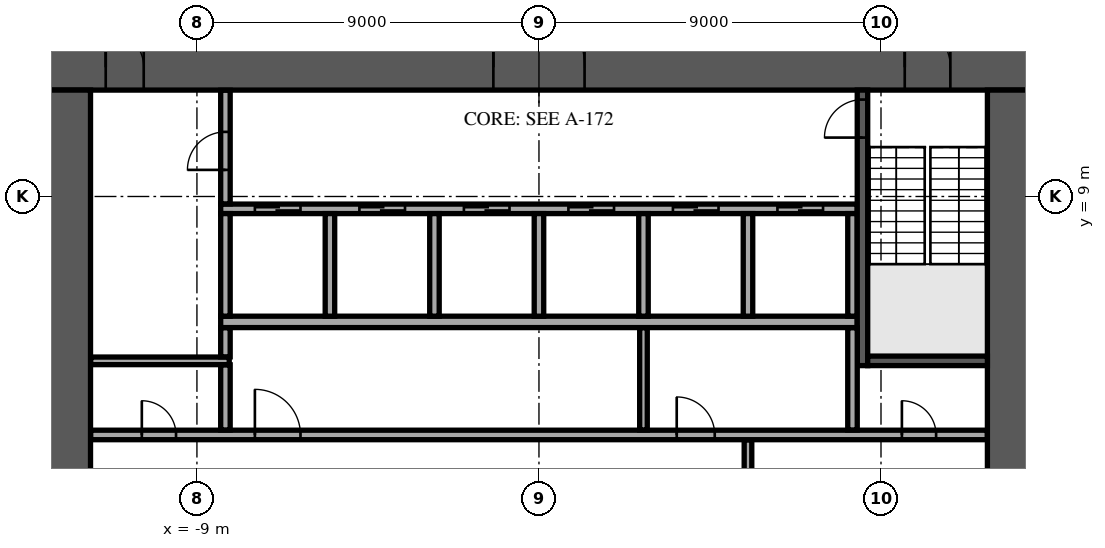
"""IFC4 building model, lengths in metres.
Left out: names, types, materials, properties, quantities, classifications, styles, units other than length and angle.
Written with IfcOpenShell. Run it as: python <this file> out.ifc"""

import sys

from ifc_helpers import new_model, si_unit, direction, frame, frame_2d, origin, place, context, subcontext, project, spatial, rectangle, extrude, element, fill, save


model = new_model("IFC4")
c1 = context("Model", 3, precision=1e-05, world=origin(), true_north=direction((0.0, 1.0)))
c2 = subcontext(c1, "Body", "Model", "MODEL_VIEW")
j1 = project(units=[si_unit("LENGTHUNIT", "METRE"), si_unit("PLANEANGLEUNIT", "RADIAN")], contexts=[c1])
p1 = place(None, origin())
s1 = spatial("IfcSite", under=j1, at=p1, CompositionType="ELEMENT")
p2 = place(p1, origin())
s2 = spatial("IfcBuilding", under=s1, at=p2, CompositionType="ELEMENT")
p3 = place(p2, frame((0.0, 0.0, 59.7)))
s3 = spatial("IfcBuildingStorey", under=s2, at=p3, CompositionType="ELEMENT", Elevation=59.7)
p4 = place(p3, frame((-13.0, 12.4, 0.0), z_axis=(0.0, 0.0, 1.0), x_axis=(1.0, 0.0, 0.0)))
e1 = element("IfcWall", 1, at=p4, inside=s3, PredefinedType="SHEAR", context=c2, shape_type="SweptSolid", body=[
    extrude(rectangle(XDim=26.0, YDim=1.2, at=frame_2d((13.0, 0.0))), origin(), (0.0, 0.0, 1.0), 3.75),
])
p5 = place(p4, frame((11.8, 0.0, 0.0)))
e2 = element("IfcOpeningElement", 2, at=p5, cuts=e1, PredefinedType="OPENING", context=c2, shape_type="SweptSolid", body=[
    extrude(rectangle(XDim=2.4, YDim=2.4, at=frame_2d((1.2, 1.2))), frame((0.0, 0.61, 0.0), z_axis=(0.0, -1.0, 0.0), x_axis=(1.0, 0.0, 0.0)), (0.0, 0.0, 1.0), 1.22),
])
p6 = place(p4, frame((22.625, 0.0, 0.0)))
e3 = element("IfcOpeningElement", 3, at=p6, cuts=e1, PredefinedType="OPENING", context=c2, shape_type="SweptSolid", body=[
    extrude(rectangle(XDim=1.2, YDim=2.1, at=frame_2d((0.6, 1.05))), frame((0.0, 0.61, 0.0), z_axis=(0.0, -1.0, 0.0), x_axis=(1.0, 0.0, 0.0)), (0.0, 0.0, 1.0), 1.22),
])
p7 = place(p4, frame((1.6, 0.0, 0.0)))
e4 = element("IfcOpeningElement", 4, at=p7, cuts=e1, PredefinedType="OPENING", context=c2, shape_type="SweptSolid", body=[
    extrude(rectangle(XDim=1.0, YDim=2.1, at=frame_2d((0.5, 1.05))), frame((0.0, 0.61, 0.0), z_axis=(0.0, -1.0, 0.0), x_axis=(1.0, 0.0, 0.0)), (0.0, 0.0, 1.0), 1.22),
])
p8 = place(p3, frame((12.4, -11.8, 0.0), z_axis=(0.0, 0.0, 1.0), x_axis=(0.0, 1.0, 0.0)))
e5 = element("IfcWall", 5, at=p8, inside=s3, PredefinedType="SHEAR", context=c2, shape_type="SweptSolid", body=[
    extrude(rectangle(XDim=23.6, YDim=1.2, at=frame_2d((11.8, 0.0))), origin(), (0.0, 0.0, 1.0), 3.75),
])
p9 = place(p8, frame((10.6, 0.0, 0.0)))
e6 = element("IfcOpeningElement", 6, at=p9, cuts=e5, PredefinedType="OPENING", context=c2, shape_type="SweptSolid", body=[
    extrude(rectangle(XDim=2.4, YDim=2.4, at=frame_2d((1.2, 1.2))), frame((0.0, 0.61, 0.0), z_axis=(0.0, -1.0, 0.0), x_axis=(1.0, 0.0, 0.0)), (0.0, 0.0, 1.0), 1.22),
])
p10 = place(p3, frame((-12.4, -11.8, 0.0), z_axis=(0.0, 0.0, 1.0), x_axis=(0.0, 1.0, 0.0)))
e7 = element("IfcWall", 7, at=p10, inside=s3, PredefinedType="SHEAR", context=c2, shape_type="SweptSolid", body=[
    extrude(rectangle(XDim=23.6, YDim=1.2, at=frame_2d((11.8, 0.0))), origin(), (0.0, 0.0, 1.0), 3.75),
])
p11 = place(p10, frame((10.6, 0.0, 0.0)))
e8 = element("IfcOpeningElement", 8, at=p11, cuts=e7, PredefinedType="OPENING", context=c2, shape_type="SweptSolid", body=[
    extrude(rectangle(XDim=2.4, YDim=2.4, at=frame_2d((1.2, 1.2))), frame((0.0, 0.61, 0.0), z_axis=(0.0, -1.0, 0.0), x_axis=(1.0, 0.0, 0.0)), (0.0, 0.0, 1.0), 1.22),
])
p12 = place(p3, frame((-8.375, 5.7, 0.0), z_axis=(0.0, 0.0, 1.0), x_axis=(1.0, 0.0, 0.0)))
e9 = element("IfcWall", 9, at=p12, inside=s3, PredefinedType="SOLIDWALL", context=c2, shape_type="SweptSolid", body=[
    extrude(rectangle(XDim=16.75, YDim=0.3, at=frame_2d((8.375, 0.0))), origin(), (0.0, 0.0, 1.0), 3.75),
])
p13 = place(p3, frame((-8.375, 8.675, 0.0), z_axis=(0.0, 0.0, 1.0), x_axis=(1.0, 0.0, 0.0)))
e10 = element("IfcWall", 10, at=p13, inside=s3, PredefinedType="SOLIDWALL", context=c2, shape_type="SweptSolid", body=[
    extrude(rectangle(XDim=16.75, YDim=0.25, at=frame_2d((8.375, 0.0))), origin(), (0.0, 0.0, 1.0), 3.75),
])
p14 = place(p13, frame((0.9, 0.0, 0.0)))
e11 = element("IfcOpeningElement", 11, at=p14, cuts=e10, PredefinedType="OPENING", context=c2, shape_type="SweptSolid", body=[
    extrude(rectangle(XDim=1.2, YDim=2.1, at=frame_2d((0.6, 1.05))), frame((0.0, 0.135, 0.0), z_axis=(0.0, -1.0, 0.0), x_axis=(1.0, 0.0, 0.0)), (0.0, 0.0, 1.0), 0.27),
])
p15 = place(p13, frame((3.65, 0.0, 0.0)))
e12 = element("IfcOpeningElement", 12, at=p15, cuts=e10, PredefinedType="OPENING", context=c2, shape_type="SweptSolid", body=[
    extrude(rectangle(XDim=1.2, YDim=2.1, at=frame_2d((0.6, 1.05))), frame((0.0, 0.135, 0.0), z_axis=(0.0, -1.0, 0.0), x_axis=(1.0, 0.0, 0.0)), (0.0, 0.0, 1.0), 0.27),
])
p16 = place(p13, frame((6.4, 0.0, 0.0)))
e13 = element("IfcOpeningElement", 13, at=p16, cuts=e10, PredefinedType="OPENING", context=c2, shape_type="SweptSolid", body=[
    extrude(rectangle(XDim=1.2, YDim=2.1, at=frame_2d((0.6, 1.05))), frame((0.0, 0.135, 0.0), z_axis=(0.0, -1.0, 0.0), x_axis=(1.0, 0.0, 0.0)), (0.0, 0.0, 1.0), 0.27),
])
p17 = place(p13, frame((9.15, 0.0, 0.0)))
e14 = element("IfcOpeningElement", 14, at=p17, cuts=e10, PredefinedType="OPENING", context=c2, shape_type="SweptSolid", body=[
    extrude(rectangle(XDim=1.2, YDim=2.1, at=frame_2d((0.6, 1.05))), frame((0.0, 0.135, 0.0), z_axis=(0.0, -1.0, 0.0), x_axis=(1.0, 0.0, 0.0)), (0.0, 0.0, 1.0), 0.27),
])
p18 = place(p13, frame((11.9, 0.0, 0.0)))
e15 = element("IfcOpeningElement", 15, at=p18, cuts=e10, PredefinedType="OPENING", context=c2, shape_type="SweptSolid", body=[
    extrude(rectangle(XDim=1.2, YDim=2.1, at=frame_2d((0.6, 1.05))), frame((0.0, 0.135, 0.0), z_axis=(0.0, -1.0, 0.0), x_axis=(1.0, 0.0, 0.0)), (0.0, 0.0, 1.0), 0.27),
])
p19 = place(p13, frame((14.65, 0.0, 0.0)))
e16 = element("IfcOpeningElement", 16, at=p19, cuts=e10, PredefinedType="OPENING", context=c2, shape_type="SweptSolid", body=[
    extrude(rectangle(XDim=1.2, YDim=2.1, at=frame_2d((0.6, 1.05))), frame((0.0, 0.135, 0.0), z_axis=(0.0, -1.0, 0.0), x_axis=(1.0, 0.0, 0.0)), (0.0, 0.0, 1.0), 0.27),
])
for number, where, z_axis, x_axis in (
    (17, (-8.25, 5.85, 0.0), (0.0, 0.0, 1.0), (0.0, 1.0, 0.0)),
    (18, (-5.5, 5.85, 0.0), (0.0, 0.0, 1.0), (0.0, 1.0, 0.0)),
    (19, (-2.75, 5.85, 0.0), (0.0, 0.0, 1.0), (0.0, 1.0, 0.0)),
    (20, (0.0, 5.85, 0.0), (0.0, 0.0, 1.0), (0.0, 1.0, 0.0)),
    (21, (2.75, 5.85, 0.0), (0.0, 0.0, 1.0), (0.0, 1.0, 0.0)),
    (22, (5.5, 5.85, 0.0), (0.0, 0.0, 1.0), (0.0, 1.0, 0.0)),
    (23, (8.25, 5.85, 0.0), (0.0, 0.0, 1.0), (0.0, 1.0, 0.0)),
):
    element("IfcWall", number, at=place(p3, frame(where, z_axis=z_axis, x_axis=x_axis)), inside=s3, PredefinedType="SOLIDWALL", context=c2, shape_type="SweptSolid", body=[
        extrude(rectangle(XDim=2.7, YDim=0.25, at=frame_2d((1.35, 0.0))), origin(), (0.0, 0.0, 1.0), 3.75),
    ])
p20 = place(p3, frame((8.512, 4.55, 0.0), z_axis=(0.0, 0.0, 1.0), x_axis=(0.0, 1.0, 0.0)))
e24 = element("IfcWall", 24, at=p20, inside=s3, PredefinedType="SOLIDWALL", context=c2, shape_type="SweptSolid", body=[
    extrude(rectangle(XDim=7.25, YDim=0.275, at=frame_2d((3.625, 0.0))), origin(), (0.0, 0.0, 1.0), 3.75),
])
p21 = place(p20, frame((6.0, 0.0, 0.0)))
e25 = element("IfcOpeningElement", 25, at=p21, cuts=e24, PredefinedType="OPENING", context=c2, shape_type="SweptSolid", body=[
    extrude(rectangle(XDim=1.0, YDim=2.1, at=frame_2d((0.5, 1.05))), frame((0.0, 0.147, 0.0), z_axis=(0.0, -1.0, 0.0), x_axis=(1.0, 0.0, 0.0)), (0.0, 0.0, 1.0), 0.295),
])
p22 = place(p3, frame((8.65, 4.675, 0.0), z_axis=(0.0, 0.0, 1.0), x_axis=(1.0, 0.0, 0.0)))
e26 = element("IfcWall", 26, at=p22, inside=s3, PredefinedType="SOLIDWALL", context=c2, shape_type="SweptSolid", body=[
    extrude(rectangle(XDim=3.15, YDim=0.25, at=frame_2d((1.575, 0.0))), origin(), (0.0, 0.0, 1.0), 3.75),
])
p23 = place(p3, frame((5.5, -2.595, 0.0), z_axis=(0.0, 0.0, 1.0), x_axis=(0.0, 1.0, 0.0)))
e27 = element("IfcWall", 27, at=p23, inside=s3, PredefinedType="PARTITIONING", context=c2, shape_type="SweptSolid", body=[
    extrude(rectangle(XDim=5.19, YDim=0.2, at=frame_2d((2.595, 0.0))), origin(), (0.0, 0.0, 1.0), 3.75),
])
p24 = place(p23, frame((1.395, 0.0, 0.0)))
e28 = element("IfcOpeningElement", 28, at=p24, cuts=e27, PredefinedType="OPENING", context=c2, shape_type="SweptSolid", body=[
    extrude(rectangle(XDim=2.4, YDim=2.4, at=frame_2d((1.2, 1.2))), frame((0.0, 0.11, 0.0), z_axis=(0.0, -1.0, 0.0), x_axis=(1.0, 0.0, 0.0)), (0.0, 0.0, 1.0), 0.22),
])
p25 = place(p3, frame((-11.795, 2.725, 0.0), z_axis=(0.0, 0.0, 1.0), x_axis=(1.0, 0.0, 0.0)))
e29 = element("IfcWall", 29, at=p25, inside=s3, PredefinedType="PARTITIONING", context=c2, shape_type="SweptSolid", body=[
    extrude(rectangle(XDim=23.59, YDim=0.25, at=frame_2d((11.795, 0.0))), origin(), (0.0, 0.0, 1.0), 3.75),
])
p26 = place(p25, frame((21.345, 0.0, 0.0)))
e30 = element("IfcOpeningElement", 30, at=p26, cuts=e29, PredefinedType="OPENING", context=c2, shape_type="SweptSolid", body=[
    extrude(rectangle(XDim=0.9, YDim=2.1, at=frame_2d((0.45, 1.05))), frame((0.0, 0.135, 0.0), z_axis=(0.0, -1.0, 0.0), x_axis=(1.0, 0.0, 0.0)), (0.0, 0.0, 1.0), 0.27),
])
p27 = place(p25, frame((1.345, 0.0, 0.0)))
e31 = element("IfcOpeningElement", 31, at=p27, cuts=e29, PredefinedType="OPENING", context=c2, shape_type="SweptSolid", body=[
    extrude(rectangle(XDim=0.9, YDim=2.1, at=frame_2d((0.45, 1.05))), frame((0.0, 0.135, 0.0), z_axis=(0.0, -1.0, 0.0), x_axis=(1.0, 0.0, 0.0)), (0.0, 0.0, 1.0), 0.27),
])
p28 = place(p25, frame((4.32, 0.0, 0.0)))
e32 = element("IfcOpeningElement", 32, at=p28, cuts=e29, PredefinedType="OPENING", context=c2, shape_type="SweptSolid", body=[
    extrude(rectangle(XDim=1.2, YDim=2.1, at=frame_2d((0.6, 1.05))), frame((0.0, 0.135, 0.0), z_axis=(0.0, -1.0, 0.0), x_axis=(1.0, 0.0, 0.0)), (0.0, 0.0, 1.0), 0.27),
])
p29 = place(p25, frame((15.42, 0.0, 0.0)))
e33 = element("IfcOpeningElement", 33, at=p29, cuts=e29, PredefinedType="OPENING", context=c2, shape_type="SweptSolid", body=[
    extrude(rectangle(XDim=1.0, YDim=2.1, at=frame_2d((0.5, 1.05))), frame((0.0, 0.135, 0.0), z_axis=(0.0, -1.0, 0.0), x_axis=(1.0, 0.0, 0.0)), (0.0, 0.0, 1.0), 0.27),
])
p30 = place(p3, frame((-8.25, 2.855, 0.0), z_axis=(0.0, 0.0, 1.0), x_axis=(0.0, 1.0, 0.0)))
e34 = element("IfcWall", 34, at=p30, inside=s3, PredefinedType="PARTITIONING", context=c2, shape_type="SweptSolid", body=[
    extrude(rectangle(XDim=1.715, YDim=0.25, at=frame_2d((0.857, 0.0))), origin(), (0.0, 0.0, 1.0), 3.75),
])
p31 = place(p3, frame((2.75, 2.855, 0.0), z_axis=(0.0, 0.0, 1.0), x_axis=(0.0, 1.0, 0.0)))
e35 = element("IfcWall", 35, at=p31, inside=s3, PredefinedType="PARTITIONING", context=c2, shape_type="SweptSolid", body=[
    extrude(rectangle(XDim=2.69, YDim=0.2, at=frame_2d((1.345, 0.0))), origin(), (0.0, 0.0, 1.0), 3.75),
])
p32 = place(p3, frame((8.25, 2.855, 0.0), z_axis=(0.0, 0.0, 1.0), x_axis=(0.0, 1.0, 0.0)))
e36 = element("IfcWall", 36, at=p32, inside=s3, PredefinedType="PARTITIONING", context=c2, shape_type="SweptSolid", body=[
    extrude(rectangle(XDim=2.69, YDim=0.25, at=frame_2d((1.345, 0.0))), origin(), (0.0, 0.0, 1.0), 3.75),
])
p33 = place(p3, frame((-11.795, 4.675, 0.0), z_axis=(0.0, 0.0, 1.0), x_axis=(1.0, 0.0, 0.0)))
e37 = element("IfcWall", 37, at=p33, inside=s3, PredefinedType="PARTITIONING", context=c2, shape_type="SweptSolid", body=[
    extrude(rectangle(XDim=3.645, YDim=0.2, at=frame_2d((1.823, 0.0))), origin(), (0.0, 0.0, 1.0), 3.75),
])
p34 = place(p3, frame((-8.25, 4.78, 0.0), z_axis=(0.0, 0.0, 1.0), x_axis=(0.0, 1.0, 0.0)))
e38 = element("IfcWall", 38, at=p34, inside=s3, PredefinedType="PARTITIONING", context=c2, shape_type="SweptSolid", body=[
    extrude(rectangle(XDim=0.765, YDim=0.25, at=frame_2d((0.382, 0.0))), origin(), (0.0, 0.0, 1.0), 3.75),
])
p35 = place(p3, frame((-8.25, 8.805, 0.0), z_axis=(0.0, 0.0, 1.0), x_axis=(0.0, 1.0, 0.0)))
e39 = element("IfcWall", 39, at=p35, inside=s3, PredefinedType="PARTITIONING", context=c2, shape_type="SweptSolid", body=[
    extrude(rectangle(XDim=2.99, YDim=0.25, at=frame_2d((1.495, 0.0))), origin(), (0.0, 0.0, 1.0), 3.75),
])
p36 = place(p35, frame((0.895, 0.0, 0.0)))
e40 = element("IfcOpeningElement", 40, at=p36, cuts=e39, PredefinedType="OPENING", context=c2, shape_type="SweptSolid", body=[
    extrude(rectangle(XDim=1.0, YDim=2.1, at=frame_2d((0.5, 1.05))), frame((0.0, 0.135, 0.0), z_axis=(0.0, -1.0, 0.0), x_axis=(1.0, 0.0, 0.0)), (0.0, 0.0, 1.0), 0.27),
])
p37 = place(p5, origin())
e41 = element("IfcDoor", 41, at=p37, inside=s3, OperationType="SINGLE_SWING_LEFT", PredefinedType="DOOR", context=c2, shape_type="SweptSolid", body=[
    extrude(rectangle(XDim=2.4, YDim=2.4, at=frame_2d((1.2, 1.2))), frame((0.0, 0.025, 0.0), z_axis=(0.0, -1.0, 0.0), x_axis=(1.0, 0.0, 0.0)), (0.0, 0.0, 1.0), 0.05),
])
fill(e2, e41)
p38 = place(p6, origin())
e42 = element("IfcDoor", 42, at=p38, inside=s3, OperationType="SINGLE_SWING_LEFT", PredefinedType="DOOR", context=c2, shape_type="SweptSolid", body=[
    extrude(rectangle(XDim=1.2, YDim=2.1, at=frame_2d((0.6, 1.05))), frame((0.0, 0.025, 0.0), z_axis=(0.0, -1.0, 0.0), x_axis=(1.0, 0.0, 0.0)), (0.0, 0.0, 1.0), 0.05),
])
fill(e3, e42)
p39 = place(p7, origin())
e43 = element("IfcDoor", 43, at=p39, inside=s3, OperationType="SINGLE_SWING_LEFT", PredefinedType="DOOR", context=c2, shape_type="SweptSolid", body=[
    extrude(rectangle(XDim=1.0, YDim=2.1, at=frame_2d((0.5, 1.05))), frame((0.0, 0.025, 0.0), z_axis=(0.0, -1.0, 0.0), x_axis=(1.0, 0.0, 0.0)), (0.0, 0.0, 1.0), 0.05),
])
fill(e4, e43)
p40 = place(p14, origin())
e44 = element("IfcDoor", 44, at=p40, inside=s3, OperationType="DOUBLE_DOOR_SLIDING", PredefinedType="DOOR", context=c2, shape_type="SweptSolid", body=[
    extrude(rectangle(XDim=1.2, YDim=2.1, at=frame_2d((0.6, 1.05))), frame((0.0, 0.025, 0.0), z_axis=(0.0, -1.0, 0.0), x_axis=(1.0, 0.0, 0.0)), (0.0, 0.0, 1.0), 0.05),
])
fill(e11, e44)
p41 = place(p15, origin())
e45 = element("IfcDoor", 45, at=p41, inside=s3, OperationType="DOUBLE_DOOR_SLIDING", PredefinedType="DOOR", context=c2, shape_type="SweptSolid", body=[
    extrude(rectangle(XDim=1.2, YDim=2.1, at=frame_2d((0.6, 1.05))), frame((0.0, 0.025, 0.0), z_axis=(0.0, -1.0, 0.0), x_axis=(1.0, 0.0, 0.0)), (0.0, 0.0, 1.0), 0.05),
])
fill(e12, e45)
p42 = place(p16, origin())
e46 = element("IfcDoor", 46, at=p42, inside=s3, OperationType="DOUBLE_DOOR_SLIDING", PredefinedType="DOOR", context=c2, shape_type="SweptSolid", body=[
    extrude(rectangle(XDim=1.2, YDim=2.1, at=frame_2d((0.6, 1.05))), frame((0.0, 0.025, 0.0), z_axis=(0.0, -1.0, 0.0), x_axis=(1.0, 0.0, 0.0)), (0.0, 0.0, 1.0), 0.05),
])
fill(e13, e46)
p43 = place(p17, origin())
e47 = element("IfcDoor", 47, at=p43, inside=s3, OperationType="DOUBLE_DOOR_SLIDING", PredefinedType="DOOR", context=c2, shape_type="SweptSolid", body=[
    extrude(rectangle(XDim=1.2, YDim=2.1, at=frame_2d((0.6, 1.05))), frame((0.0, 0.025, 0.0), z_axis=(0.0, -1.0, 0.0), x_axis=(1.0, 0.0, 0.0)), (0.0, 0.0, 1.0), 0.05),
])
fill(e14, e47)
p44 = place(p18, origin())
e48 = element("IfcDoor", 48, at=p44, inside=s3, OperationType="DOUBLE_DOOR_SLIDING", PredefinedType="DOOR", context=c2, shape_type="SweptSolid", body=[
    extrude(rectangle(XDim=1.2, YDim=2.1, at=frame_2d((0.6, 1.05))), frame((0.0, 0.025, 0.0), z_axis=(0.0, -1.0, 0.0), x_axis=(1.0, 0.0, 0.0)), (0.0, 0.0, 1.0), 0.05),
])
fill(e15, e48)
p45 = place(p19, origin())
e49 = element("IfcDoor", 49, at=p45, inside=s3, OperationType="DOUBLE_DOOR_SLIDING", PredefinedType="DOOR", context=c2, shape_type="SweptSolid", body=[
    extrude(rectangle(XDim=1.2, YDim=2.1, at=frame_2d((0.6, 1.05))), frame((0.0, 0.025, 0.0), z_axis=(0.0, -1.0, 0.0), x_axis=(1.0, 0.0, 0.0)), (0.0, 0.0, 1.0), 0.05),
])
fill(e16, e49)
p46 = place(p21, origin())
e50 = element("IfcDoor", 50, at=p46, inside=s3, OperationType="SINGLE_SWING_LEFT", PredefinedType="DOOR", context=c2, shape_type="SweptSolid", body=[
    extrude(rectangle(XDim=1.0, YDim=2.1, at=frame_2d((0.5, 1.05))), frame((0.0, 0.025, 0.0), z_axis=(0.0, -1.0, 0.0), x_axis=(1.0, 0.0, 0.0)), (0.0, 0.0, 1.0), 0.05),
])
fill(e25, e50)
p47 = place(p26, origin())
e51 = element("IfcDoor", 51, at=p47, inside=s3, OperationType="SINGLE_SWING_RIGHT", PredefinedType="DOOR", context=c2, shape_type="SweptSolid", body=[
    extrude(rectangle(XDim=0.9, YDim=2.1, at=frame_2d((0.45, 1.05))), frame((0.0, 0.025, 0.0), z_axis=(0.0, -1.0, 0.0), x_axis=(1.0, 0.0, 0.0)), (0.0, 0.0, 1.0), 0.05),
])
fill(e30, e51)
p48 = place(p27, origin())
e52 = element("IfcDoor", 52, at=p48, inside=s3, OperationType="SINGLE_SWING_RIGHT", PredefinedType="DOOR", context=c2, shape_type="SweptSolid", body=[
    extrude(rectangle(XDim=0.9, YDim=2.1, at=frame_2d((0.45, 1.05))), frame((0.0, 0.025, 0.0), z_axis=(0.0, -1.0, 0.0), x_axis=(1.0, 0.0, 0.0)), (0.0, 0.0, 1.0), 0.05),
])
fill(e31, e52)
p49 = place(p36, origin())
e53 = element("IfcDoor", 53, at=p49, inside=s3, OperationType="SINGLE_SWING_RIGHT", PredefinedType="DOOR", context=c2, shape_type="SweptSolid", body=[
    extrude(rectangle(XDim=1.0, YDim=2.1, at=frame_2d((0.5, 1.05))), frame((0.0, 0.025, 0.0), z_axis=(0.0, -1.0, 0.0), x_axis=(1.0, 0.0, 0.0)), (0.0, 0.0, 1.0), 0.05),
])
fill(e40, e53)
p50 = place(p28, origin())
e54 = element("IfcDoor", 54, at=p50, inside=s3, OperationType="SINGLE_SWING_LEFT", PredefinedType="DOOR", context=c2, shape_type="SweptSolid", body=[
    extrude(rectangle(XDim=1.2, YDim=2.1, at=frame_2d((0.6, 1.05))), frame((0.0, 0.025, 0.0), z_axis=(0.0, -1.0, 0.0), x_axis=(1.0, 0.0, 0.0)), (0.0, 0.0, 1.0), 0.05),
])
fill(e32, e54)
p51 = place(p29, origin())
e55 = element("IfcDoor", 55, at=p51, inside=s3, OperationType="SINGLE_SWING_RIGHT", PredefinedType="DOOR", context=c2, shape_type="SweptSolid", body=[
    extrude(rectangle(XDim=1.0, YDim=2.1, at=frame_2d((0.5, 1.05))), frame((0.0, 0.025, 0.0), z_axis=(0.0, -1.0, 0.0), x_axis=(1.0, 0.0, 0.0)), (0.0, 0.0, 1.0), 0.05),
])
fill(e33, e55)
save(model, sys.argv[1])
